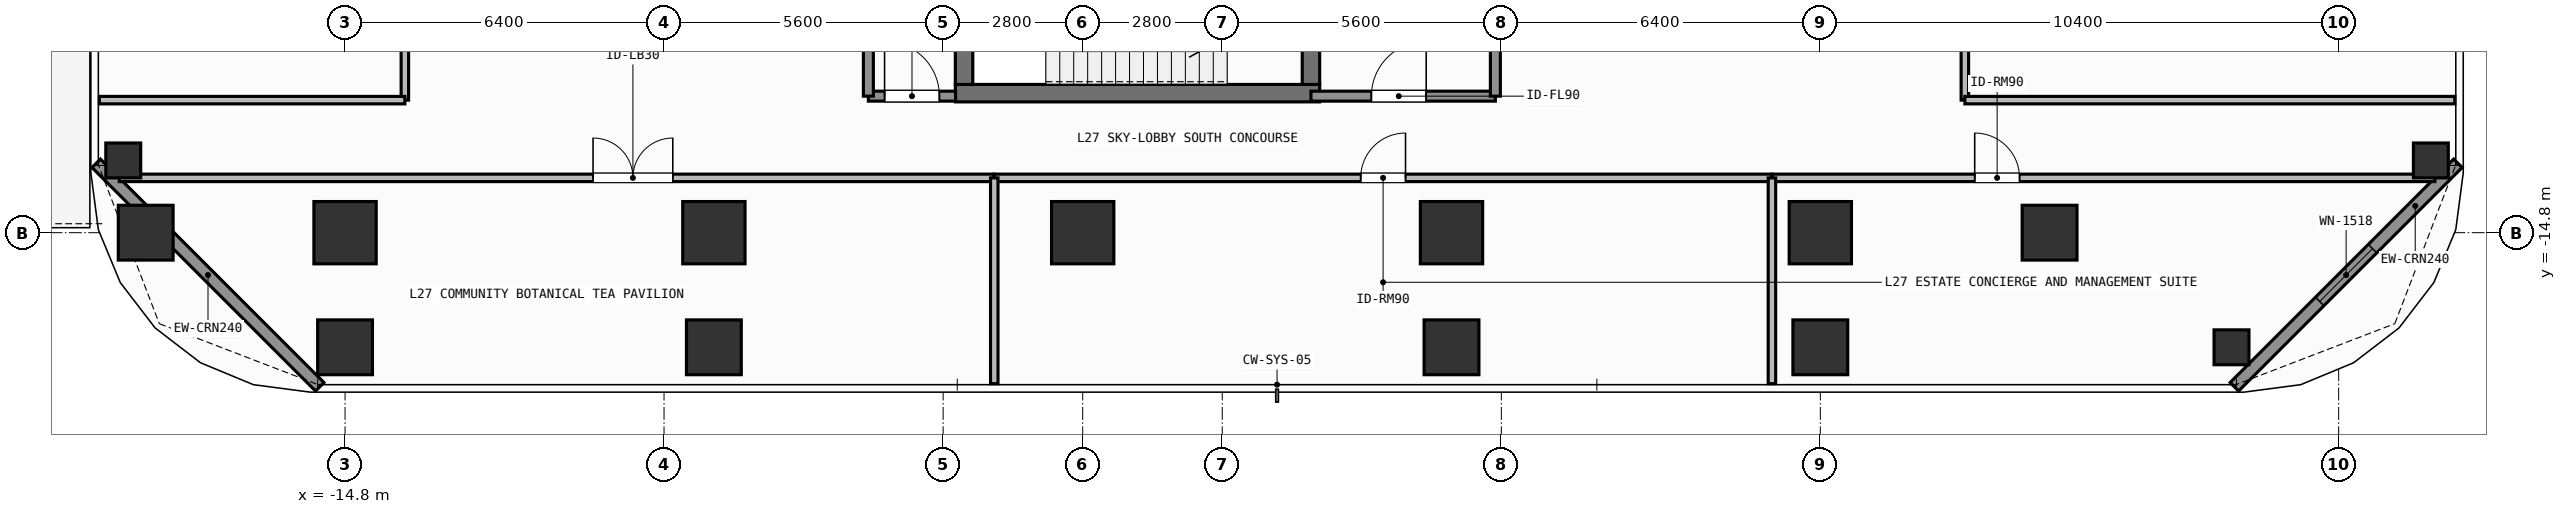
"""IFC4 building model, lengths in metres.
Left out: names, types, materials, properties, quantities, classifications, styles, units other than length and angle.
Written with IfcOpenShell. Run it as: python <this file> out.ifc"""

import sys

from ifc_helpers import new_model, si_unit, direction, frame, frame_2d, origin, origin_2d, place, context, subcontext, project, spatial, rectangle, hollow_rectangle, extrude, element, fill, save


model = new_model("IFC4")
c1 = context("Model", 3, precision=1e-05, world=origin(), true_north=direction((0.0, 1.0)))
c2 = subcontext(c1, "Body", "Model", "MODEL_VIEW")
j1 = project(units=[si_unit("LENGTHUNIT", "METRE"), si_unit("PLANEANGLEUNIT", "RADIAN")], contexts=[c1])
p1 = place(None, origin())
s1 = spatial("IfcSite", under=j1, at=p1, CompositionType="ELEMENT")
p2 = place(p1, origin())
s2 = spatial("IfcBuilding", under=s1, at=p2, CompositionType="ELEMENT")
p3 = place(p2, frame((0.0, 0.0, 108.6)))
s3 = spatial("IfcBuildingStorey", under=s2, at=p3, CompositionType="ELEMENT", Elevation=108.6)
p4 = place(p3, frame((-2.555, -12.0, 0.0), z_axis=(0.0, 0.0, 1.0), x_axis=(1.0, 0.0, 0.0)))
e1 = element("IfcWall", 1, at=p4, inside=s3, PredefinedType="SHEAR", context=c2, shape_type="SweptSolid", body=[
    extrude(rectangle(XDim=7.31, YDim=0.35, at=frame_2d((3.655, 0.0))), origin(), (0.0, 0.0, 1.0), 4.8),
])
p5 = place(p3, frame((-2.38, -11.825, 0.0), z_axis=(0.0, 0.0, 1.0), x_axis=(0.0, 1.0, 0.0)))
e2 = element("IfcWall", 2, at=p5, inside=s3, PredefinedType="SHEAR", context=c2, shape_type="SweptSolid", body=[
    extrude(rectangle(XDim=2.925, YDim=0.35, at=frame_2d((1.462, 0.0))), origin(), (0.0, 0.0, 1.0), 4.8),
])
p6 = place(p3, frame((4.58, -8.9, 0.0), z_axis=(0.0, 0.0, 1.0), x_axis=(0.0, -1.0, 0.0)))
e3 = element("IfcWall", 3, at=p6, inside=s3, PredefinedType="SHEAR", context=c2, shape_type="SweptSolid", body=[
    extrude(rectangle(XDim=2.925, YDim=0.35, at=frame_2d((1.462, 0.0))), origin(), (0.0, 0.0, 1.0), 4.8),
])
p7 = place(p6, frame((0.913, 0.0, 0.0)))
e4 = element("IfcOpeningElement", 4, at=p7, cuts=e3, PredefinedType="OPENING", context=c2, shape_type="SweptSolid", body=[
    extrude(rectangle(XDim=1.1, YDim=2.15, at=frame_2d((0.55, 1.075))), frame((0.0, 0.185, 0.0), z_axis=(0.0, -1.0, 0.0), x_axis=(1.0, 0.0, 0.0)), (0.0, 0.0, 1.0), 0.37),
])
for number, where, z_axis, x_axis in (
    (5, (-14.8, -14.8, 0.0), (0.0, 0.0, 1.0), (1.0, 0.0, 0.0)),
    (6, (-7.4, -14.8, 0.0), (0.0, 0.0, 1.0), (1.0, 0.0, 0.0)),
    (7, (0.0, -14.8, 0.0), (0.0, 0.0, 1.0), (1.0, 0.0, 0.0)),
    (8, (7.4, -14.8, 0.0), (0.0, 0.0, 1.0), (1.0, 0.0, 0.0)),
    (9, (14.8, -14.8, 0.0), (0.0, 0.0, 1.0), (1.0, 0.0, 0.0)),
):
    element("IfcColumn", number, at=place(p3, frame(where, z_axis=z_axis, x_axis=x_axis)), inside=s3, PredefinedType="COLUMN", context=c2, shape_type="SweptSolid", body=[
        extrude(rectangle(XDim=1.25, YDim=1.25, at=origin_2d()), origin(), (0.0, 0.0, 1.0), 4.8),
    ])
for number, where, z_axis, x_axis in (
    (10, (-18.8, -14.8, 0.0), (0.0, 0.0, 1.0), (1.0, 0.0, 0.0)),
    (11, (19.4, -14.8, 0.0), (0.0, 0.0, 1.0), (1.0, 0.0, 0.0)),
    (12, (-14.8, -17.1, 0.0), (0.0, 0.0, 1.0), (1.0, 0.0, 0.0)),
    (13, (-7.4, -17.1, 0.0), (0.0, 0.0, 1.0), (1.0, 0.0, 0.0)),
    (14, (7.4, -17.1, 0.0), (0.0, 0.0, 1.0), (1.0, 0.0, 0.0)),
    (15, (14.8, -17.1, 0.0), (0.0, 0.0, 1.0), (1.0, 0.0, 0.0)),
):
    element("IfcColumn", number, at=place(p3, frame(where, z_axis=z_axis, x_axis=x_axis)), inside=s3, PredefinedType="COLUMN", context=c2, shape_type="SweptSolid", body=[
        extrude(rectangle(XDim=1.1, YDim=1.1, at=origin_2d()), origin(), (0.0, 0.0, 1.0), 4.8),
    ])
for number, where, z_axis, x_axis in (
    (16, (23.05, -17.1, 0.0), (0.0, 0.0, 1.0), (1.0, 0.0, 0.0)),
    (17, (-19.25, -13.35, 0.0), (0.0, 0.0, 1.0), (1.0, 0.0, 0.0)),
    (18, (27.05, -13.35, 0.0), (0.0, 0.0, 1.0), (1.0, 0.0, 0.0)),
):
    element("IfcColumn", number, at=place(p3, frame(where, z_axis=z_axis, x_axis=x_axis)), inside=s3, PredefinedType="COLUMN", context=c2, shape_type="SweptSolid", body=[
        extrude(hollow_rectangle(XDim=0.7, YDim=0.7, WallThickness=0.032, at=origin_2d()), origin(), (0.0, 0.0, 1.0), 4.8),
    ])
p8 = place(p3, frame((-15.308, -17.892, 0.0), z_axis=(0.0, 0.0, 1.0), x_axis=(-0.707126027686, 0.707087534163, 0.0)))
e19 = element("IfcWall", 19, at=p8, inside=s3, PredefinedType="SOLIDWALL", context=c2, shape_type="SweptSolid", body=[
    extrude(rectangle(XDim=6.342, YDim=0.24, at=frame_2d((3.171, 0.0))), origin(), (0.0, 0.0, 1.0), 4.58),
])
p9 = place(p3, frame((27.592, -13.408, 0.0), z_axis=(0.0, 0.0, 1.0), x_axis=(-0.707106781187, -0.707106781187, 0.0)))
e20 = element("IfcWall", 20, at=p9, inside=s3, PredefinedType="SOLIDWALL", context=c2, shape_type="SweptSolid", body=[
    extrude(rectangle(XDim=6.342, YDim=0.24, at=frame_2d((3.171, 0.0))), origin(), (0.0, 0.0, 1.0), 4.58),
])
p10 = place(p9, frame((2.421, 0.0, 0.8)))
e21 = element("IfcOpeningElement", 21, at=p10, cuts=e20, PredefinedType="OPENING", context=c2, shape_type="SweptSolid", body=[
    extrude(rectangle(XDim=1.5, YDim=1.85, at=frame_2d((0.75, 0.925))), frame((0.0, 0.13, 0.0), z_axis=(0.0, -1.0, 0.0), x_axis=(1.0, 0.0, 0.0)), (0.0, 0.0, 1.0), 0.26),
])
p11 = place(p3, frame((4.58, -12.06, 0.0), z_axis=(0.0, 0.0, 1.0), x_axis=(1.0, 0.0, 0.0)))
e22 = element("IfcWall", 22, at=p11, inside=s3, PredefinedType="SOLIDWALL", context=c2, shape_type="SweptSolid", body=[
    extrude(rectangle(XDim=3.7, YDim=0.2, at=frame_2d((1.85, 0.0))), origin(), (0.0, 0.0, 1.0), 4.58),
])
p12 = place(p11, frame((1.212, 0.0, 0.0)))
e23 = element("IfcOpeningElement", 23, at=p12, cuts=e22, PredefinedType="OPENING", context=c2, shape_type="SweptSolid", body=[
    extrude(rectangle(XDim=1.1, YDim=2.15, at=frame_2d((0.55, 1.075))), frame((0.0, 0.11, 0.0), z_axis=(0.0, -1.0, 0.0), x_axis=(1.0, 0.0, 0.0)), (0.0, 0.0, 1.0), 0.22),
])
p13 = place(p3, frame((-4.3, -12.06, 0.0), z_axis=(0.0, 0.0, 1.0), x_axis=(1.0, 0.0, 0.0)))
e24 = element("IfcWall", 24, at=p13, inside=s3, PredefinedType="SOLIDWALL", context=c2, shape_type="SweptSolid", body=[
    extrude(rectangle(XDim=1.75, YDim=0.2, at=frame_2d((0.875, 0.0))), origin(), (0.0, 0.0, 1.0), 4.58),
])
p14 = place(p13, frame((0.325, 0.0, 0.0)))
e25 = element("IfcOpeningElement", 25, at=p14, cuts=e24, PredefinedType="OPENING", context=c2, shape_type="SweptSolid", body=[
    extrude(rectangle(XDim=1.1, YDim=2.15, at=frame_2d((0.55, 1.075))), frame((0.0, 0.11, 0.0), z_axis=(0.0, -1.0, 0.0), x_axis=(1.0, 0.0, 0.0)), (0.0, 0.0, 1.0), 0.22),
])
p15 = place(p3, frame((-19.33, -13.7, 0.0), z_axis=(0.0, 0.0, 1.0), x_axis=(1.0, 0.0, 0.0)))
e26 = element("IfcWall", 26, at=p15, inside=s3, PredefinedType="PARTITIONING", context=c2, shape_type="SweptSolid", body=[
    extrude(rectangle(XDim=17.556, YDim=0.15, at=frame_2d((8.778, 0.0))), origin(), (0.0, 0.0, 1.0), 4.58),
])
p16 = place(p15, frame((9.506, 0.0, 0.0)))
e27 = element("IfcOpeningElement", 27, at=p16, cuts=e26, PredefinedType="OPENING", context=c2, shape_type="SweptSolid", body=[
    extrude(rectangle(XDim=1.6, YDim=2.3, at=frame_2d((0.8, 1.15))), frame((0.0, 0.085, 0.0), z_axis=(0.0, -1.0, 0.0), x_axis=(1.0, 0.0, 0.0)), (0.0, 0.0, 1.0), 0.17),
])
p17 = place(p3, frame((-1.774, -13.7, 0.0), z_axis=(0.0, 0.0, 1.0), x_axis=(1.0, 0.0, 0.0)))
e28 = element("IfcWall", 28, at=p17, inside=s3, PredefinedType="PARTITIONING", context=c2, shape_type="SweptSolid", body=[
    extrude(rectangle(XDim=15.603, YDim=0.15, at=frame_2d((7.802, 0.0))), origin(), (0.0, 0.0, 1.0), 4.58),
])
p18 = place(p17, frame((7.352, 0.0, 0.0)))
e29 = element("IfcOpeningElement", 29, at=p18, cuts=e28, PredefinedType="OPENING", context=c2, shape_type="SweptSolid", body=[
    extrude(rectangle(XDim=0.9, YDim=2.1, at=frame_2d((0.45, 1.05))), frame((0.0, 0.085, 0.0), z_axis=(0.0, -1.0, 0.0), x_axis=(1.0, 0.0, 0.0)), (0.0, 0.0, 1.0), 0.17),
])
p19 = place(p3, frame((13.829, -13.7, 0.0), z_axis=(0.0, 0.0, 1.0), x_axis=(1.0, 0.0, 0.0)))
e30 = element("IfcWall", 30, at=p19, inside=s3, PredefinedType="PARTITIONING", context=c2, shape_type="SweptSolid", body=[
    extrude(rectangle(XDim=13.301, YDim=0.15, at=frame_2d((6.65, 0.0))), origin(), (0.0, 0.0, 1.0), 4.58),
])
p20 = place(p19, frame((4.069, 0.0, 0.0)))
e31 = element("IfcOpeningElement", 31, at=p20, cuts=e30, PredefinedType="OPENING", context=c2, shape_type="SweptSolid", body=[
    extrude(rectangle(XDim=0.9, YDim=2.1, at=frame_2d((0.45, 1.05))), frame((0.0, 0.085, 0.0), z_axis=(0.0, -1.0, 0.0), x_axis=(1.0, 0.0, 0.0)), (0.0, 0.0, 1.0), 0.17),
])
p21 = place(p3, frame((-13.6, -12.14, 0.0), z_axis=(0.0, 0.0, 1.0), x_axis=(0.0, 1.0, 0.0)))
e32 = element("IfcWall", 32, at=p21, inside=s3, PredefinedType="PARTITIONING", context=c2, shape_type="SweptSolid", body=[
    extrude(rectangle(XDim=24.28, YDim=0.15, at=frame_2d((12.14, 0.0))), origin(), (0.0, 0.0, 1.0), 4.58),
])
p22 = place(p21, frame((11.25, 0.0, 0.0)))
e33 = element("IfcOpeningElement", 33, at=p22, cuts=e32, PredefinedType="OPENING", context=c2, shape_type="SweptSolid", body=[
    extrude(rectangle(XDim=1.6, YDim=2.3, at=frame_2d((0.8, 1.15))), frame((0.0, 0.085, 0.0), z_axis=(0.0, -1.0, 0.0), x_axis=(1.0, 0.0, 0.0)), (0.0, 0.0, 1.0), 0.17),
])
p23 = place(p3, frame((17.7, -12.14, 0.0), z_axis=(0.0, 0.0, 1.0), x_axis=(0.0, 1.0, 0.0)))
e34 = element("IfcWall", 34, at=p23, inside=s3, PredefinedType="PARTITIONING", context=c2, shape_type="SweptSolid", body=[
    extrude(rectangle(XDim=24.28, YDim=0.15, at=frame_2d((12.14, 0.0))), origin(), (0.0, 0.0, 1.0), 4.58),
])
p24 = place(p23, frame((11.25, 0.0, 0.0)))
e35 = element("IfcOpeningElement", 35, at=p24, cuts=e34, PredefinedType="OPENING", context=c2, shape_type="SweptSolid", body=[
    extrude(rectangle(XDim=1.6, YDim=2.3, at=frame_2d((0.8, 1.15))), frame((0.0, 0.085, 0.0), z_axis=(0.0, -1.0, 0.0), x_axis=(1.0, 0.0, 0.0)), (0.0, 0.0, 1.0), 0.17),
])
for number, where, z_axis, x_axis in (
    (36, (8.28, -12.06, 0.0), (0.0, 0.0, 1.0), (0.0, 1.0, 0.0)),
    (37, (-4.3, -12.06, 0.0), (0.0, 0.0, 1.0), (0.0, 1.0, 0.0)),
):
    element("IfcWall", number, at=place(p3, frame(where, z_axis=z_axis, x_axis=x_axis)), inside=s3, PredefinedType="SOLIDWALL", context=c2, shape_type="SweptSolid", body=[
        extrude(rectangle(XDim=3.185, YDim=0.2, at=frame_2d((1.593, 0.0))), origin(), (0.0, 0.0, 1.0), 4.58),
    ])
for number, where, z_axis, x_axis in (
    (38, (-1.774, -17.83, 0.0), (0.0, 0.0, 1.0), (0.0, 1.0, 0.0)),
    (39, (13.829, -17.83, 0.0), (0.0, 0.0, 1.0), (0.0, 1.0, 0.0)),
):
    element("IfcWall", number, at=place(p3, frame(where, z_axis=z_axis, x_axis=x_axis)), inside=s3, PredefinedType="PARTITIONING", context=c2, shape_type="SweptSolid", body=[
        extrude(rectangle(XDim=4.13, YDim=0.15, at=frame_2d((2.065, 0.0))), origin(), (0.0, 0.0, 1.0), 4.58),
    ])
p25 = place(p3, frame((-19.73, -12.14, 0.0), z_axis=(0.0, 0.0, 1.0), x_axis=(1.0, 0.0, 0.0)))
e40 = element("IfcWall", 40, at=p25, inside=s3, PredefinedType="PARTITIONING", context=c2, shape_type="SweptSolid", body=[
    extrude(rectangle(XDim=6.13, YDim=0.15, at=frame_2d((3.065, 0.0))), origin(), (0.0, 0.0, 1.0), 4.58),
])
p26 = place(p3, frame((17.7, -12.14, 0.0), z_axis=(0.0, 0.0, 1.0), x_axis=(1.0, 0.0, 0.0)))
e41 = element("IfcWall", 41, at=p26, inside=s3, PredefinedType="PARTITIONING", context=c2, shape_type="SweptSolid", body=[
    extrude(rectangle(XDim=9.83, YDim=0.15, at=frame_2d((4.915, 0.0))), origin(), (0.0, 0.0, 1.0), 4.58),
])
p27 = place(p10, origin())
e42 = element("IfcWindow", 42, at=p27, inside=s3, PartitioningType="SINGLE_PANEL", PredefinedType="WINDOW", context=c2, shape_type="SweptSolid", body=[
    extrude(rectangle(XDim=1.5, YDim=1.85, at=frame_2d((0.75, 0.925))), frame((0.0, 0.03, 0.0), z_axis=(0.0, -1.0, 0.0), x_axis=(1.0, 0.0, 0.0)), (0.0, 0.0, 1.0), 0.06),
])
fill(e21, e42)
p28 = place(p12, origin())
e43 = element("IfcDoor", 43, at=p28, inside=s3, OperationType="SINGLE_SWING_RIGHT", PredefinedType="DOOR", context=c2, shape_type="SweptSolid", body=[
    extrude(rectangle(XDim=1.1, YDim=2.15, at=frame_2d((0.55, 1.075))), frame((0.0, 0.025, 0.0), z_axis=(0.0, -1.0, 0.0), x_axis=(1.0, 0.0, 0.0)), (0.0, 0.0, 1.0), 0.05),
])
fill(e23, e43)
p29 = place(p14, origin())
e44 = element("IfcDoor", 44, at=p29, inside=s3, OperationType="SINGLE_SWING_LEFT", PredefinedType="DOOR", context=c2, shape_type="SweptSolid", body=[
    extrude(rectangle(XDim=1.1, YDim=2.15, at=frame_2d((0.55, 1.075))), frame((0.0, 0.025, 0.0), z_axis=(0.0, -1.0, 0.0), x_axis=(1.0, 0.0, 0.0)), (0.0, 0.0, 1.0), 0.05),
])
fill(e25, e44)
p30 = place(p16, origin())
e45 = element("IfcDoor", 45, at=p30, inside=s3, OperationType="SINGLE_SWING_LEFT", PredefinedType="DOOR", context=c2, shape_type="SweptSolid", body=[
    extrude(rectangle(XDim=1.6, YDim=2.3, at=frame_2d((0.8, 1.15))), frame((0.0, 0.025, 0.0), z_axis=(0.0, -1.0, 0.0), x_axis=(1.0, 0.0, 0.0)), (0.0, 0.0, 1.0), 0.05),
])
fill(e27, e45)
p31 = place(p18, origin())
e46 = element("IfcDoor", 46, at=p31, inside=s3, OperationType="SINGLE_SWING_RIGHT", PredefinedType="DOOR", context=c2, shape_type="SweptSolid", body=[
    extrude(rectangle(XDim=0.9, YDim=2.1, at=frame_2d((0.45, 1.05))), frame((0.0, 0.025, 0.0), z_axis=(0.0, -1.0, 0.0), x_axis=(1.0, 0.0, 0.0)), (0.0, 0.0, 1.0), 0.05),
])
fill(e29, e46)
p32 = place(p20, origin())
e47 = element("IfcDoor", 47, at=p32, inside=s3, OperationType="SINGLE_SWING_LEFT", PredefinedType="DOOR", context=c2, shape_type="SweptSolid", body=[
    extrude(rectangle(XDim=0.9, YDim=2.1, at=frame_2d((0.45, 1.05))), frame((0.0, 0.025, 0.0), z_axis=(0.0, -1.0, 0.0), x_axis=(1.0, 0.0, 0.0)), (0.0, 0.0, 1.0), 0.05),
])
fill(e31, e47)
save(model, sys.argv[1])
